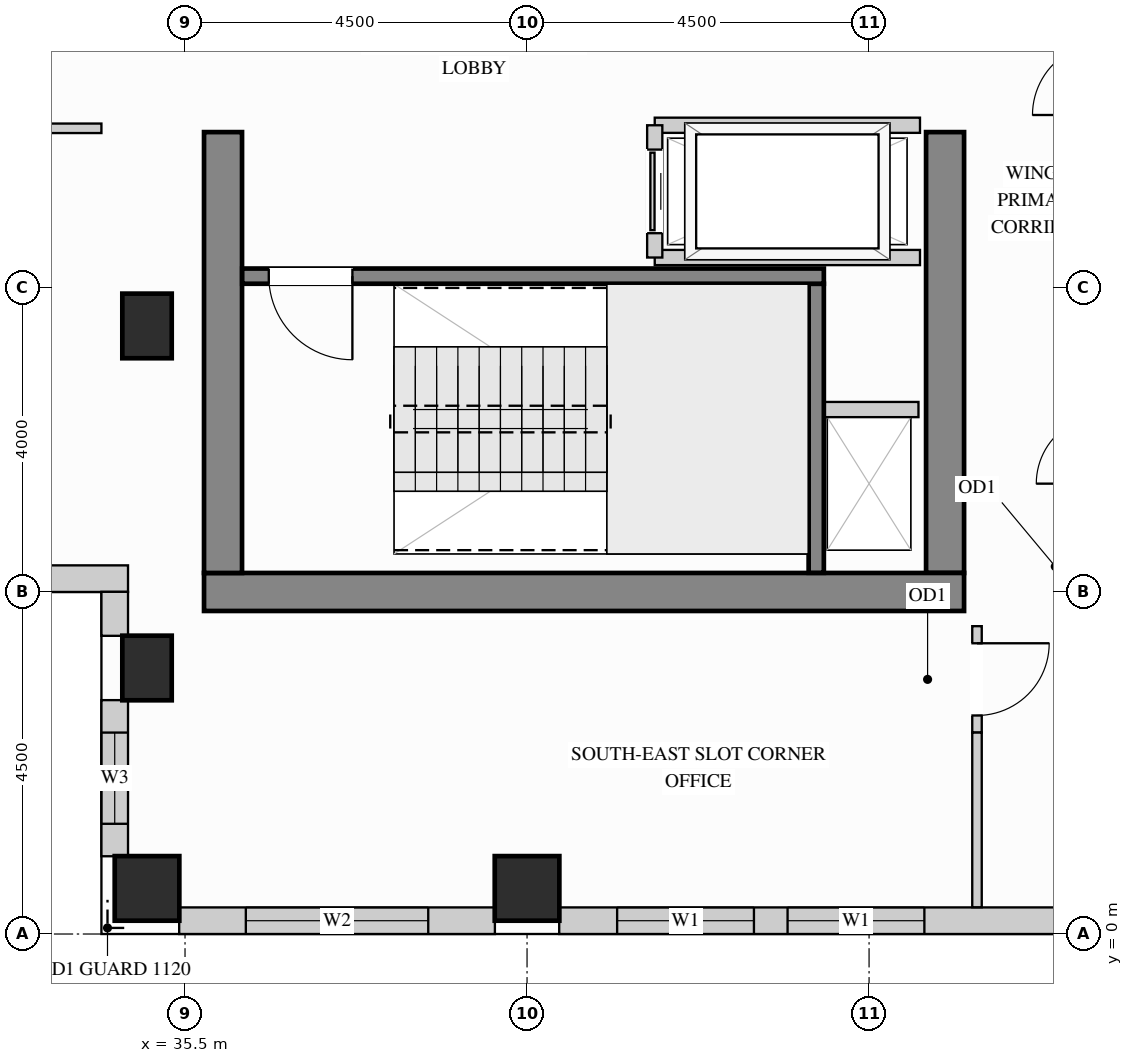
"""IFC4 building model, lengths in metres.
Left out: names, types, materials, properties, quantities, classifications, styles, units other than length and angle.
Written with IfcOpenShell. Run it as: python <this file> out.ifc"""

import sys

from ifc_helpers import new_model, si_unit, direction, frame, frame_2d, origin, origin_2d, place, context, subcontext, project, spatial, rectangle, extrude, source, transform, mapped, element, fill, save


model = new_model("IFC4")
c1 = context("Model", 3, precision=1e-05, world=origin(), true_north=direction((0.0, 1.0)))
c2 = subcontext(c1, "Body", "Model", "MODEL_VIEW")
j1 = project(units=[si_unit("LENGTHUNIT", "METRE"), si_unit("PLANEANGLEUNIT", "RADIAN")], contexts=[c1])
p1 = place(None, origin())
s1 = spatial("IfcSite", under=j1, at=p1, CompositionType="ELEMENT")
p2 = place(p1, origin())
s2 = spatial("IfcBuilding", under=s1, at=p2, CompositionType="ELEMENT")
p3 = place(p2, frame((0.0, 0.0, 212.4)))
s3 = spatial("IfcBuildingStorey", under=s2, at=p3, CompositionType="ELEMENT", Elevation=212.4)
m1 = source(origin(), c2, "Body", "SweptSolid", [
    extrude(rectangle(XDim=0.65, YDim=0.85, at=origin_2d()), origin(), (0.0, 0.0, 1.0), 3.4),
])
for number, where, z_axis, x_axis in (
    (1, (35.0, 3.5, 0.0), (0.0, 0.0, 1.0), (1.0, 0.0, 0.0)),
    (2, (35.0, 8.0, 0.0), (0.0, 0.0, 1.0), (1.0, 0.0, 0.0)),
):
    element("IfcColumn", number, at=place(p3, frame(where, z_axis=z_axis, x_axis=x_axis)), inside=s3, PredefinedType="COLUMN", context=c2, shape_type="MappedRepresentation", body=[
        mapped(m1, transform((0.0, 0.0, 0.0), x_axis=(1.0, 0.0, 0.0), y_axis=(0.0, 1.0, 0.0), z_axis=(0.0, 0.0, 1.0))),
    ])
m2 = source(origin(), c2, "Body", "SweptSolid", [
    extrude(rectangle(XDim=0.85, YDim=0.85, at=origin_2d()), origin(), (0.0, 0.0, 1.0), 3.4),
])
for number, where, z_axis, x_axis in (
    (3, (35.0, 0.6, 0.0), (0.0, 0.0, 1.0), (1.0, 0.0, 0.0)),
    (4, (40.0, 0.6, 0.0), (0.0, 0.0, 1.0), (1.0, 0.0, 0.0)),
):
    element("IfcColumn", number, at=place(p3, frame(where, z_axis=z_axis, x_axis=x_axis)), inside=s3, PredefinedType="COLUMN", context=c2, shape_type="MappedRepresentation", body=[
        mapped(m2, transform((0.0, 0.0, 0.0), x_axis=(1.0, 0.0, 0.0), y_axis=(0.0, 1.0, 0.0), z_axis=(0.0, 0.0, 1.0))),
    ])
m3 = source(origin(), c2, "Body", "SweptSolid", [
    extrude(rectangle(XDim=5.8, YDim=0.5, at=frame_2d((2.9, 0.0))), origin(), (0.0, 0.0, 1.0), 3.4),
])
p4 = place(p3, frame((45.5, 4.75, 0.0), z_axis=(0.0, 0.0, 1.0), x_axis=(0.0, 1.0, 0.0)))
e5 = element("IfcWall", 5, at=p4, inside=s3, PredefinedType="SHEAR", context=c2, shape_type="MappedRepresentation", body=[
    mapped(m3, transform((0.0, 0.0, 0.0), x_axis=(1.0, 0.0, 0.0), y_axis=(0.0, 1.0, 0.0), z_axis=(0.0, 0.0, 1.0))),
])
m4 = source(origin(), c2, "Body", "SweptSolid", [
    extrude(rectangle(XDim=10.0, YDim=0.5, at=frame_2d((5.0, 0.0))), origin(), (0.0, 0.0, 1.0), 3.4),
])
p5 = place(p3, frame((35.75, 4.5, 0.0), z_axis=(0.0, 0.0, 1.0), x_axis=(1.0, 0.0, 0.0)))
e6 = element("IfcWall", 6, at=p5, inside=s3, PredefinedType="SHEAR", context=c2, shape_type="MappedRepresentation", body=[
    mapped(m4, transform((0.0, 0.0, 0.0), x_axis=(1.0, 0.0, 0.0), y_axis=(0.0, 1.0, 0.0), z_axis=(0.0, 0.0, 1.0))),
])
p6 = place(p3, frame((36.0, 4.75, 0.0), z_axis=(0.0, 0.0, 1.0), x_axis=(0.0, 1.0, 0.0)))
e7 = element("IfcWall", 7, at=p6, inside=s3, PredefinedType="SHEAR", context=c2, shape_type="MappedRepresentation", body=[
    mapped(m3, transform((0.0, 0.0, 0.0), x_axis=(1.0, 0.0, 0.0), y_axis=(0.0, 1.0, 0.0), z_axis=(0.0, 0.0, 1.0))),
])
p7 = place(p3, frame((19.15, 4.675, 0.0), z_axis=(0.0, 0.0, 1.0), x_axis=(1.0, 0.0, 0.0)))
e8 = element("IfcWall", 8, at=p7, inside=s3, PredefinedType="SOLIDWALL", context=c2, shape_type="SweptSolid", body=[
    extrude(rectangle(XDim=15.6, YDim=0.35, at=frame_2d((7.8, 0.0))), origin(), (0.0, 0.0, 1.0), 3.385),
])
p8 = place(p7, frame((4.307, 0.0, 0.78)))
e9 = element("IfcOpeningElement", 9, at=p8, cuts=e8, PredefinedType="OPENING", context=c2, shape_type="SweptSolid", body=[
    extrude(rectangle(XDim=1.5, YDim=2.0, at=frame_2d((0.75, 1.0))), frame((0.0, 0.185, 0.0), z_axis=(0.0, -1.0, 0.0), x_axis=(1.0, 0.0, 0.0)), (0.0, 0.0, 1.0), 0.37),
])
p9 = place(p7, frame((9.793, 0.0, 0.78)))
e10 = element("IfcOpeningElement", 10, at=p9, cuts=e8, PredefinedType="OPENING", context=c2, shape_type="SweptSolid", body=[
    extrude(rectangle(XDim=1.5, YDim=2.0, at=frame_2d((0.75, 1.0))), frame((0.0, 0.185, 0.0), z_axis=(0.0, -1.0, 0.0), x_axis=(1.0, 0.0, 0.0)), (0.0, 0.0, 1.0), 0.37),
])
m5 = source(origin(), c2, "Body", "SweptSolid", [
    extrude(rectangle(XDim=0.579, YDim=0.35, at=frame_2d((0.29, 0.0))), origin(), (0.0, 0.0, 1.0), 3.385),
])
p10 = place(p3, frame((34.575, 4.502, 0.0), z_axis=(0.0, 0.0, 1.0), x_axis=(0.0, -1.0, 0.0)))
e11 = element("IfcWall", 11, at=p10, inside=s3, PredefinedType="SOLIDWALL", context=c2, shape_type="MappedRepresentation", body=[
    mapped(m5, transform((0.0, 0.0, 0.0), x_axis=(1.0, 0.0, 0.0), y_axis=(0.0, 1.0, 0.0), z_axis=(0.0, 0.0, 1.0))),
])
p11 = place(p3, frame((34.575, 3.077, 0.0), z_axis=(0.0, 0.0, 1.0), x_axis=(0.0, -1.0, 0.0)))
e12 = element("IfcWall", 12, at=p11, inside=s3, PredefinedType="SOLIDWALL", context=c2, shape_type="SweptSolid", body=[
    extrude(rectangle(XDim=2.054, YDim=0.35, at=frame_2d((1.027, 0.0))), origin(), (0.0, 0.0, 1.0), 3.385),
])
p12 = place(p11, frame((0.427, 0.0, 0.78)))
e13 = element("IfcOpeningElement", 13, at=p12, cuts=e12, PredefinedType="OPENING", context=c2, shape_type="SweptSolid", body=[
    extrude(rectangle(XDim=1.2, YDim=2.0, at=frame_2d((0.6, 1.0))), frame((0.0, 0.185, 0.0), z_axis=(0.0, -1.0, 0.0), x_axis=(1.0, 0.0, 0.0)), (0.0, 0.0, 1.0), 0.37),
])
p13 = place(p3, frame((35.423, 0.175, 0.0), z_axis=(0.0, 0.0, 1.0), x_axis=(1.0, 0.0, 0.0)))
e14 = element("IfcWall", 14, at=p13, inside=s3, PredefinedType="SOLIDWALL", context=c2, shape_type="SweptSolid", body=[
    extrude(rectangle(XDim=4.154, YDim=0.35, at=frame_2d((2.077, 0.0))), origin(), (0.0, 0.0, 1.0), 3.385),
])
p14 = place(p13, frame((0.877, 0.0, 0.78)))
e15 = element("IfcOpeningElement", 15, at=p14, cuts=e14, PredefinedType="OPENING", context=c2, shape_type="SweptSolid", body=[
    extrude(rectangle(XDim=2.4, YDim=2.1, at=frame_2d((1.2, 1.05))), frame((0.0, 0.185, 0.0), z_axis=(0.0, -1.0, 0.0), x_axis=(1.0, 0.0, 0.0)), (0.0, 0.0, 1.0), 0.37),
])
p15 = place(p3, frame((40.423, 0.175, 0.0), z_axis=(0.0, 0.0, 1.0), x_axis=(1.0, 0.0, 0.0)))
e16 = element("IfcWall", 16, at=p15, inside=s3, PredefinedType="SOLIDWALL", context=c2, shape_type="SweptSolid", body=[
    extrude(rectangle(XDim=7.077, YDim=0.35, at=frame_2d((3.539, 0.0))), origin(), (0.0, 0.0, 1.0), 3.385),
])
p16 = place(p15, frame((0.762, 0.0, 0.78)))
e17 = element("IfcOpeningElement", 17, at=p16, cuts=e16, PredefinedType="OPENING", context=c2, shape_type="SweptSolid", body=[
    extrude(rectangle(XDim=1.8, YDim=2.1, at=frame_2d((0.9, 1.05))), frame((0.0, 0.185, 0.0), z_axis=(0.0, -1.0, 0.0), x_axis=(1.0, 0.0, 0.0)), (0.0, 0.0, 1.0), 0.37),
])
p17 = place(p15, frame((3.005, 0.0, 0.78)))
e18 = element("IfcOpeningElement", 18, at=p17, cuts=e16, PredefinedType="OPENING", context=c2, shape_type="SweptSolid", body=[
    extrude(rectangle(XDim=1.8, YDim=2.1, at=frame_2d((0.9, 1.05))), frame((0.0, 0.185, 0.0), z_axis=(0.0, -1.0, 0.0), x_axis=(1.0, 0.0, 0.0)), (0.0, 0.0, 1.0), 0.37),
])
p18 = place(p3, frame((45.92, 2.65, 0.0), z_axis=(0.0, 0.0, 1.0), x_axis=(0.0, 1.0, 0.0)))
e19 = element("IfcWall", 19, at=p18, inside=s3, PredefinedType="PARTITIONING", context=c2, shape_type="SweptSolid", body=[
    extrude(rectangle(XDim=1.4, YDim=0.125, at=frame_2d((0.7, 0.0))), origin(), (0.0, 0.0, 1.0), 3.385),
])
p19 = place(p18, frame((0.225, 0.0, 0.0)))
e20 = element("IfcOpeningElement", 20, at=p19, cuts=e19, PredefinedType="OPENING", context=c2, shape_type="SweptSolid", body=[
    extrude(rectangle(XDim=0.95, YDim=2.15, at=frame_2d((0.475, 1.075))), frame((0.0, 0.073, 0.0), z_axis=(0.0, -1.0, 0.0), x_axis=(1.0, 0.0, 0.0)), (0.0, 0.0, 1.0), 0.145),
])
m6 = source(origin(), c2, "Body", "SweptSolid", [
    extrude(rectangle(XDim=2.298, YDim=0.125, at=frame_2d((1.149, 0.0))), origin(), (0.0, 0.0, 1.0), 3.385),
])
p20 = place(p3, frame((45.92, 0.352, 0.0), z_axis=(0.0, 0.0, 1.0), x_axis=(0.0, 1.0, 0.0)))
e21 = element("IfcWall", 21, at=p20, inside=s3, PredefinedType="PARTITIONING", context=c2, shape_type="MappedRepresentation", body=[
    mapped(m6, transform((0.0, 0.0, 0.0), x_axis=(1.0, 0.0, 0.0), y_axis=(0.0, 1.0, 0.0), z_axis=(0.0, 0.0, 1.0))),
])
p21 = place(p3, frame((19.5, 10.6, 0.0), z_axis=(0.0, 0.0, 1.0), x_axis=(1.0, 0.0, 0.0)))
e22 = element("IfcWall", 22, at=p21, inside=s3, PredefinedType="PARTITIONING", context=c2, shape_type="SweptSolid", body=[
    extrude(rectangle(XDim=14.9, YDim=0.125, at=frame_2d((7.45, 0.0))), origin(), (0.0, 0.0, 1.0), 3.385),
])
p22 = place(p21, frame((6.975, 0.0, 0.0)))
e23 = element("IfcOpeningElement", 23, at=p22, cuts=e22, PredefinedType="OPENING", context=c2, shape_type="SweptSolid", body=[
    extrude(rectangle(XDim=0.95, YDim=2.15, at=frame_2d((0.475, 1.075))), frame((0.0, 0.073, 0.0), z_axis=(0.0, -1.0, 0.0), x_axis=(1.0, 0.0, 0.0)), (0.0, 0.0, 1.0), 0.145),
])
m7 = source(origin(), c2, "Body", "SweptSolid", [
    extrude(rectangle(XDim=1.3, YDim=0.2, at=frame_2d((0.65, 0.0))), origin(), (0.0, 0.0, 1.0), 3.385),
])
p23 = place(p3, frame((43.85, 6.9, 0.0), z_axis=(0.0, 0.0, 1.0), x_axis=(1.0, 0.0, 0.0)))
e24 = element("IfcWall", 24, at=p23, inside=s3, PredefinedType="PARTITIONING", context=c2, shape_type="MappedRepresentation", body=[
    mapped(m7, transform((0.0, 0.0, 0.0), x_axis=(1.0, 0.0, 0.0), y_axis=(0.0, 1.0, 0.0), z_axis=(0.0, 0.0, 1.0))),
])
m8 = source(origin(), c2, "Body", "SweptSolid", [
    extrude(rectangle(XDim=3.49, YDim=0.2, at=frame_2d((1.745, 0.0))), origin(), (0.0, 0.0, 1.0), 3.385),
])
for number, where, z_axis, x_axis in (
    (25, (41.68, 10.64, 0.0), (0.0, 0.0, 1.0), (1.0, 0.0, 0.0)),
    (26, (41.68, 8.9, 0.0), (0.0, 0.0, 1.0), (1.0, 0.0, 0.0)),
):
    element("IfcWall", number, at=place(p3, frame(where, z_axis=z_axis, x_axis=x_axis)), inside=s3, PredefinedType="PARTITIONING", context=c2, shape_type="MappedRepresentation", body=[
        mapped(m8, transform((0.0, 0.0, 0.0), x_axis=(1.0, 0.0, 0.0), y_axis=(0.0, 1.0, 0.0), z_axis=(0.0, 0.0, 1.0))),
    ])
p24 = place(p3, frame((41.68, 8.9, 0.0), z_axis=(0.0, 0.0, 1.0), x_axis=(0.0, 1.0, 0.0)))
e27 = element("IfcWall", 27, at=p24, inside=s3, PredefinedType="PARTITIONING", context=c2, shape_type="SweptSolid", body=[
    extrude(rectangle(XDim=1.74, YDim=0.2, at=frame_2d((0.87, 0.0))), origin(), (0.0, 0.0, 1.0), 3.385),
])
p25 = place(p24, frame((0.32, 0.0, 0.0)))
e28 = element("IfcOpeningElement", 28, at=p25, cuts=e27, PredefinedType="OPENING", context=c2, shape_type="SweptSolid", body=[
    extrude(rectangle(XDim=1.1, YDim=2.2, at=frame_2d((0.55, 1.1))), frame((0.0, 0.11, 0.0), z_axis=(0.0, -1.0, 0.0), x_axis=(1.0, 0.0, 0.0)), (0.0, 0.0, 1.0), 0.22),
])
m9 = source(origin(), c2, "Body", "SweptSolid", [
    extrude(rectangle(XDim=3.803, YDim=0.2, at=frame_2d((1.901, 0.0))), origin(), (0.0, 0.0, 1.0), 3.4),
])
p26 = place(p3, frame((43.805, 4.752, 0.0), z_axis=(0.0, 0.0, 1.0), x_axis=(0.0, 1.0, 0.0)))
e29 = element("IfcWall", 29, at=p26, inside=s3, PredefinedType="SHEAR", context=c2, shape_type="MappedRepresentation", body=[
    mapped(m9, transform((0.0, 0.0, 0.0), x_axis=(1.0, 0.0, 0.0), y_axis=(0.0, 1.0, 0.0), z_axis=(0.0, 0.0, 1.0))),
])
p27 = place(p3, frame((36.252, 8.655, 0.0), z_axis=(0.0, 0.0, 1.0), x_axis=(1.0, 0.0, 0.0)))
e30 = element("IfcWall", 30, at=p27, inside=s3, PredefinedType="SHEAR", context=c2, shape_type="SweptSolid", body=[
    extrude(rectangle(XDim=7.653, YDim=0.2, at=frame_2d((3.827, 0.0))), origin(), (0.0, 0.0, 1.0), 3.4),
])
p28 = place(p27, frame((0.35, 0.0, 0.0)))
e31 = element("IfcOpeningElement", 31, at=p28, cuts=e30, PredefinedType="OPENING", context=c2, shape_type="SweptSolid", body=[
    extrude(rectangle(XDim=1.1, YDim=2.15, at=frame_2d((0.55, 1.075))), frame((0.0, 0.11, 0.0), z_axis=(0.0, -1.0, 0.0), x_axis=(1.0, 0.0, 0.0)), (0.0, 0.0, 1.0), 0.22),
])
m10 = source(origin(), c2, "Body", "SweptSolid", [
    extrude(rectangle(XDim=1.1, YDim=2.2, at=frame_2d((0.55, 1.1))), frame((0.0, 0.025, 0.0), z_axis=(0.0, -1.0, 0.0), x_axis=(1.0, 0.0, 0.0)), (0.0, 0.0, 1.0), 0.05),
])
p29 = place(p25, origin())
e32 = element("IfcDoor", 32, at=p29, inside=s3, OperationType="SLIDING_TO_LEFT", PredefinedType="DOOR", context=c2, shape_type="MappedRepresentation", body=[
    mapped(m10, transform((0.0, 0.0, 0.0), x_axis=(1.0, 0.0, 0.0), y_axis=(0.0, 1.0, 0.0), z_axis=(0.0, 0.0, 1.0))),
])
fill(e28, e32)
m11 = source(origin(), c2, "Body", "SweptSolid", [
    extrude(rectangle(XDim=0.95, YDim=2.15, at=frame_2d((0.475, 1.075))), frame((0.0, 0.025, 0.0), z_axis=(0.0, -1.0, 0.0), x_axis=(1.0, 0.0, 0.0)), (0.0, 0.0, 1.0), 0.05),
])
p30 = place(p19, origin())
e33 = element("IfcDoor", 33, at=p30, inside=s3, OperationType="SINGLE_SWING_RIGHT", PredefinedType="DOOR", context=c2, shape_type="MappedRepresentation", body=[
    mapped(m11, transform((0.0, 0.0, 0.0), x_axis=(1.0, 0.0, 0.0), y_axis=(0.0, 1.0, 0.0), z_axis=(0.0, 0.0, 1.0))),
])
fill(e20, e33)
m12 = source(origin(), c2, "Body", "SweptSolid", [
    extrude(rectangle(XDim=1.1, YDim=2.15, at=frame_2d((0.55, 1.075))), frame((0.0, 0.025, 0.0), z_axis=(0.0, -1.0, 0.0), x_axis=(1.0, 0.0, 0.0)), (0.0, 0.0, 1.0), 0.05),
])
p31 = place(p28, origin())
e34 = element("IfcDoor", 34, at=p31, inside=s3, OperationType="SINGLE_SWING_RIGHT", PredefinedType="DOOR", context=c2, shape_type="MappedRepresentation", body=[
    mapped(m12, transform((0.0, 0.0, 0.0), x_axis=(1.0, 0.0, 0.0), y_axis=(0.0, 1.0, 0.0), z_axis=(0.0, 0.0, 1.0))),
])
fill(e31, e34)
m13 = source(origin(), c2, "Body", "SweptSolid", [
    extrude(rectangle(XDim=1.8, YDim=2.1, at=frame_2d((0.9, 1.05))), frame((0.0, 0.03, 0.0), z_axis=(0.0, -1.0, 0.0), x_axis=(1.0, 0.0, 0.0)), (0.0, 0.0, 1.0), 0.06),
])
p32 = place(p16, origin())
e35 = element("IfcWindow", 35, at=p32, inside=s3, PartitioningType="SINGLE_PANEL", PredefinedType="WINDOW", context=c2, shape_type="MappedRepresentation", body=[
    mapped(m13, transform((0.0, 0.0, 0.0), x_axis=(1.0, 0.0, 0.0), y_axis=(0.0, 1.0, 0.0), z_axis=(0.0, 0.0, 1.0))),
])
fill(e17, e35)
p33 = place(p17, origin())
e36 = element("IfcWindow", 36, at=p33, inside=s3, PartitioningType="SINGLE_PANEL", PredefinedType="WINDOW", context=c2, shape_type="MappedRepresentation", body=[
    mapped(m13, transform((0.0, 0.0, 0.0), x_axis=(1.0, 0.0, 0.0), y_axis=(0.0, 1.0, 0.0), z_axis=(0.0, 0.0, 1.0))),
])
fill(e18, e36)
m14 = source(origin(), c2, "Body", "SweptSolid", [
    extrude(rectangle(XDim=2.4, YDim=2.1, at=frame_2d((1.2, 1.05))), frame((0.0, 0.03, 0.0), z_axis=(0.0, -1.0, 0.0), x_axis=(1.0, 0.0, 0.0)), (0.0, 0.0, 1.0), 0.06),
])
p34 = place(p14, origin())
e37 = element("IfcWindow", 37, at=p34, inside=s3, PartitioningType="SINGLE_PANEL", PredefinedType="WINDOW", context=c2, shape_type="MappedRepresentation", body=[
    mapped(m14, transform((0.0, 0.0, 0.0), x_axis=(1.0, 0.0, 0.0), y_axis=(0.0, 1.0, 0.0), z_axis=(0.0, 0.0, 1.0))),
])
fill(e15, e37)
m15 = source(origin(), c2, "Body", "SweptSolid", [
    extrude(rectangle(XDim=1.2, YDim=2.0, at=frame_2d((0.6, 1.0))), frame((0.0, 0.03, 0.0), z_axis=(0.0, -1.0, 0.0), x_axis=(1.0, 0.0, 0.0)), (0.0, 0.0, 1.0), 0.06),
])
p35 = place(p12, origin())
e38 = element("IfcWindow", 38, at=p35, inside=s3, PartitioningType="SINGLE_PANEL", PredefinedType="WINDOW", context=c2, shape_type="MappedRepresentation", body=[
    mapped(m15, transform((0.0, 0.0, 0.0), x_axis=(1.0, 0.0, 0.0), y_axis=(0.0, 1.0, 0.0), z_axis=(0.0, 0.0, 1.0))),
])
fill(e13, e38)
save(model, sys.argv[1])
